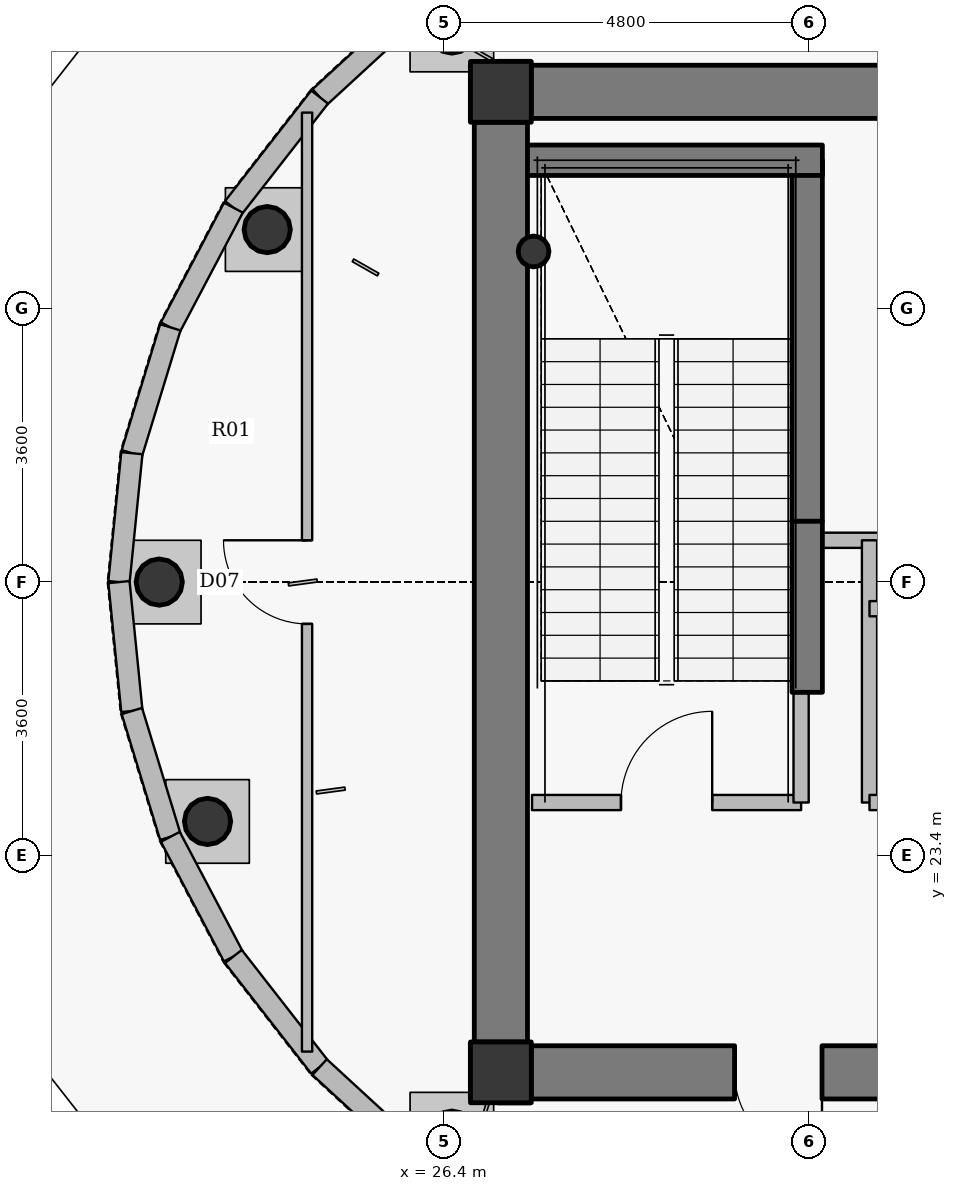
"""IFC4 building model, lengths in metres.
Left out: names, types, materials, properties, quantities, classifications, styles, units other than length and angle.
Written with IfcOpenShell. Run it as: python <this file> out.ifc"""

import sys

from ifc_helpers import new_model, si_unit, direction, frame, frame_2d, origin, origin_2d, place, context, subcontext, project, spatial, rectangle, hollow_circle, extrude, source, transform, mapped, element, fill, save


model = new_model("IFC4")
c1 = context("Model", 3, precision=1e-05, world=origin(), true_north=direction((0.0, 1.0)))
c2 = subcontext(c1, "Body", "Model", "MODEL_VIEW")
j1 = project(units=[si_unit("LENGTHUNIT", "METRE"), si_unit("PLANEANGLEUNIT", "RADIAN")], contexts=[c1])
p1 = place(None, origin())
s1 = spatial("IfcSite", under=j1, at=p1, CompositionType="ELEMENT")
p2 = place(p1, origin())
s2 = spatial("IfcBuilding", under=s1, at=p2, CompositionType="ELEMENT")
p3 = place(p2, frame((0.0, 0.0, 368.4)))
s3 = spatial("IfcBuildingStorey", under=s2, at=p3, CompositionType="ELEMENT", Elevation=368.4)
for number, where, z_axis, x_axis in (
    (1, (27.15, 20.55, 0.0), (0.0, 0.0, 1.0), (1.0, 0.0, 0.0)),
    (2, (27.15, 33.45, 0.0), (0.0, 0.0, 1.0), (1.0, 0.0, 0.0)),
):
    element("IfcColumn", number, at=place(p3, frame(where, z_axis=z_axis, x_axis=x_axis)), inside=s3, PredefinedType="COLUMN", context=c2, shape_type="SweptSolid", body=[
        extrude(rectangle(XDim=0.8, YDim=0.8, at=origin_2d()), origin(), (0.0, 0.0, 1.0), 4.8),
    ])
p4 = place(p3, frame((31.18, 27.8, 0.0), z_axis=(0.0, 0.0, 1.0), x_axis=(0.0, 1.0, 0.0)))
e3 = element("IfcWall", 3, at=p4, inside=s3, PredefinedType="SHEAR", context=c2, shape_type="SweptSolid", body=[
    extrude(rectangle(XDim=4.75, YDim=0.4, at=frame_2d((2.375, 0.0))), origin(), (0.0, 0.0, 1.0), 4.8),
])
p5 = place(p3, frame((27.25, 32.55, 0.0), z_axis=(0.0, 0.0, 1.0), x_axis=(1.0, 0.0, 0.0)))
e4 = element("IfcWall", 4, at=p5, inside=s3, PredefinedType="SHEAR", context=c2, shape_type="SweptSolid", body=[
    extrude(rectangle(XDim=4.13, YDim=0.4, at=frame_2d((2.065, 0.0))), origin(), (0.0, 0.0, 1.0), 4.8),
])
p6 = place(p3, frame((27.58, 31.35, 0.0), z_axis=(0.0, 0.0, 1.0), x_axis=(1.0, 0.0, 0.0)))
e5 = element("IfcColumn", 5, at=p6, inside=s3, PredefinedType="COLUMN", context=c2, shape_type="SweptSolid", body=[
    extrude(hollow_circle(Radius=0.203, WallThickness=0.016, at=origin_2d()), origin(), (0.0, 0.0, 1.0), 4.8),
])
p7 = place(p3, frame((27.55, 33.45, 0.0), z_axis=(0.0, 0.0, 1.0), x_axis=(1.0, 0.0, 0.0)))
e6 = element("IfcWall", 6, at=p7, inside=s3, PredefinedType="SHEAR", context=c2, shape_type="SweptSolid", body=[
    extrude(rectangle(XDim=16.9, YDim=0.7, at=frame_2d((8.45, 0.0))), origin(), (0.0, 0.0, 1.0), 4.05),
])
p8 = place(p7, frame((12.925, 0.0, 0.0)))
e7 = element("IfcOpeningElement", 7, at=p8, cuts=e6, PredefinedType="OPENING", context=c2, shape_type="SweptSolid", body=[
    extrude(rectangle(XDim=1.15, YDim=2.15, at=origin_2d()), frame((0.575, 0.36, 1.075), z_axis=(0.0, -1.0, 0.0), x_axis=(1.0, 0.0, 0.0)), (0.0, 0.0, 1.0), 0.72),
])
p9 = place(p3, frame((44.45, 20.55, 0.0), z_axis=(0.0, 0.0, 1.0), x_axis=(-1.0, 0.0, 0.0)))
e8 = element("IfcWall", 8, at=p9, inside=s3, PredefinedType="SHEAR", context=c2, shape_type="SweptSolid", body=[
    extrude(rectangle(XDim=16.9, YDim=0.7, at=frame_2d((8.45, 0.0))), origin(), (0.0, 0.0, 1.0), 4.05),
])
p10 = place(p9, frame((13.075, 0.0, 0.0)))
e9 = element("IfcOpeningElement", 9, at=p10, cuts=e8, PredefinedType="OPENING", context=c2, shape_type="SweptSolid", body=[
    extrude(rectangle(XDim=1.15, YDim=2.15, at=origin_2d()), frame((0.575, 0.36, 1.075), z_axis=(0.0, -1.0, 0.0), x_axis=(1.0, 0.0, 0.0)), (0.0, 0.0, 1.0), 0.72),
])
p11 = place(p9, frame((9.2, 0.0, 0.0)))
e10 = element("IfcOpeningElement", 10, at=p11, cuts=e8, PredefinedType="OPENING", context=c2, shape_type="SweptSolid", body=[
    extrude(rectangle(XDim=1.15, YDim=2.15, at=origin_2d()), frame((0.575, 0.36, 1.075), z_axis=(0.0, -1.0, 0.0), x_axis=(1.0, 0.0, 0.0)), (0.0, 0.0, 1.0), 0.72),
])
p12 = place(p3, frame((27.15, 20.95, 0.0), z_axis=(0.0, 0.0, 1.0), x_axis=(0.0, 1.0, 0.0)))
e11 = element("IfcWall", 11, at=p12, inside=s3, PredefinedType="SHEAR", context=c2, shape_type="SweptSolid", body=[
    extrude(rectangle(XDim=12.1, YDim=0.7, at=frame_2d((6.05, 0.0))), origin(), (0.0, 0.0, 1.0), 4.05),
])
p13 = place(p3, frame((31.18, 25.55, 0.0), z_axis=(0.0, 0.0, 1.0), x_axis=(0.0, 1.0, 0.0)))
e12 = element("IfcWall", 12, at=p13, inside=s3, PredefinedType="SHEAR", context=c2, shape_type="SweptSolid", body=[
    extrude(rectangle(XDim=2.25, YDim=0.4, at=frame_2d((1.125, 0.0))), origin(), (0.0, 0.0, 1.0), 4.1),
])
for number, where, z_axis, x_axis in (
    (13, (26.505, 34.263, -0.3), (0.0, 0.0, 1.0), (1.0, 0.0, 0.0)),
    (14, (24.075, 31.637, -0.3), (0.0, 0.0, 1.0), (1.0, 0.0, 0.0)),
    (15, (22.655, 27.0, -0.3), (0.0, 0.0, 1.0), (1.0, 0.0, 0.0)),
    (16, (23.291, 23.851, -0.3), (0.0, 0.0, 1.0), (1.0, 0.0, 0.0)),
    (17, (26.505, 19.737, -0.3), (0.0, 0.0, 1.0), (1.0, 0.0, 0.0)),
):
    element("IfcColumn", number, at=place(p3, frame(where, z_axis=z_axis, x_axis=x_axis)), inside=s3, PredefinedType="COLUMN", context=c2, shape_type="SweptSolid", body=[
        extrude(hollow_circle(Radius=0.305, WallThickness=0.025, at=origin_2d()), origin(), (0.0, 0.0, 1.0), 4.8),
    ])
p14 = place(p3, frame((24.766, 33.381, 0.0), z_axis=(0.0, 0.0, 1.0), x_axis=(0.735948763185, 0.677037235288, 0.0)))
e18 = element("IfcWall", 18, at=p14, inside=s3, PredefinedType="SOLIDWALL", context=c2, shape_type="SweptSolid", body=[
    extrude(rectangle(XDim=1.919, YDim=0.28, at=frame_2d((0.959, 0.0))), origin(), (0.0, 0.0, 1.0), 4.5),
])
p15 = place(p3, frame((23.631, 31.926, 0.0), z_axis=(0.0, 0.0, 1.0), x_axis=(0.614965988217, 0.788553633773, 0.0)))
e19 = element("IfcWall", 19, at=p15, inside=s3, PredefinedType="SOLIDWALL", context=c2, shape_type="SweptSolid", body=[
    extrude(rectangle(XDim=1.845, YDim=0.28, at=frame_2d((0.923, 0.0))), origin(), (0.0, 0.0, 1.0), 4.5),
])
p16 = place(p3, frame((22.801, 30.351, 0.0), z_axis=(0.0, 0.0, 1.0), x_axis=(0.466368181746, 0.884590707082, 0.0)))
e20 = element("IfcWall", 20, at=p16, inside=s3, PredefinedType="SOLIDWALL", context=c2, shape_type="SweptSolid", body=[
    extrude(rectangle(XDim=1.78, YDim=0.28, at=frame_2d((0.89, 0.0))), origin(), (0.0, 0.0, 1.0), 4.5),
])
p17 = place(p3, frame((22.295, 28.696, 0.0), z_axis=(0.0, 0.0, 1.0), x_axis=(0.292261538012, 0.956338430368, 0.0)))
e21 = element("IfcWall", 21, at=p17, inside=s3, PredefinedType="SOLIDWALL", context=c2, shape_type="SweptSolid", body=[
    extrude(rectangle(XDim=1.731, YDim=0.28, at=frame_2d((0.865, 0.0))), origin(), (0.0, 0.0, 1.0), 4.5),
])
for number, where, z_axis, x_axis in (
    (22, (22.125, 27.0, 0.0), (0.0, 0.0, 1.0), (0.1, 0.995, 0.0)),
    (23, (22.295, 25.304, 0.0), (0.0, 0.0, 1.0), (-0.1, 0.995, 0.0)),
):
    element("IfcWall", number, at=place(p3, frame(where, z_axis=z_axis, x_axis=x_axis)), inside=s3, PredefinedType="SOLIDWALL", context=c2, shape_type="SweptSolid", body=[
        extrude(rectangle(XDim=1.705, YDim=0.28, at=frame_2d((0.852, 0.0))), origin(), (0.0, 0.0, 1.0), 4.5),
    ])
p18 = place(p3, frame((22.801, 23.649, 0.0), z_axis=(0.0, 0.0, 1.0), x_axis=(-0.292261538012, 0.956338430368, 0.0)))
e24 = element("IfcWall", 24, at=p18, inside=s3, PredefinedType="SOLIDWALL", context=c2, shape_type="SweptSolid", body=[
    extrude(rectangle(XDim=1.731, YDim=0.28, at=frame_2d((0.865, 0.0))), origin(), (0.0, 0.0, 1.0), 4.5),
])
p19 = place(p3, frame((23.631, 22.074, 0.0), z_axis=(0.0, 0.0, 1.0), x_axis=(-0.466368181746, 0.884590707082, 0.0)))
e25 = element("IfcWall", 25, at=p19, inside=s3, PredefinedType="SOLIDWALL", context=c2, shape_type="SweptSolid", body=[
    extrude(rectangle(XDim=1.78, YDim=0.28, at=frame_2d((0.89, 0.0))), origin(), (0.0, 0.0, 1.0), 4.5),
])
p20 = place(p3, frame((24.766, 20.619, 0.0), z_axis=(0.0, 0.0, 1.0), x_axis=(-0.614965988217, 0.788553633773, 0.0)))
e26 = element("IfcWall", 26, at=p20, inside=s3, PredefinedType="SOLIDWALL", context=c2, shape_type="SweptSolid", body=[
    extrude(rectangle(XDim=1.845, YDim=0.28, at=frame_2d((0.923, 0.0))), origin(), (0.0, 0.0, 1.0), 4.5),
])
p21 = place(p3, frame((26.178, 19.32, 0.0), z_axis=(0.0, 0.0, 1.0), x_axis=(-0.735948763185, 0.677037235288, 0.0)))
e27 = element("IfcWall", 27, at=p21, inside=s3, PredefinedType="SOLIDWALL", context=c2, shape_type="SweptSolid", body=[
    extrude(rectangle(XDim=1.919, YDim=0.28, at=frame_2d((0.959, 0.0))), origin(), (0.0, 0.0, 1.0), 4.5),
])
p22 = place(p3, frame((24.6, 20.823, 0.0), z_axis=(0.0, 0.0, 1.0), x_axis=(0.0, 1.0, 0.0)))
e28 = element("IfcWall", 28, at=p22, inside=s3, PredefinedType="PARTITIONING", context=c2, shape_type="SweptSolid", body=[
    extrude(rectangle(XDim=12.353, YDim=0.135, at=frame_2d((6.177, 0.0))), origin(), (0.0, 0.0, 1.0), 3.985),
])
p23 = place(p22, frame((5.627, 0.0, 0.0)))
e29 = element("IfcOpeningElement", 29, at=p23, cuts=e28, PredefinedType="OPENING", context=c2, shape_type="SweptSolid", body=[
    extrude(rectangle(XDim=1.1, YDim=2.15, at=origin_2d()), frame((0.55, 0.078, 1.075), z_axis=(0.0, -1.0, 0.0), x_axis=(1.0, 0.0, 0.0)), (0.0, 0.0, 1.0), 0.155),
])
p24 = place(p3, frame((27.56, 24.1, 0.0), z_axis=(0.0, 0.0, 1.0), x_axis=(1.0, 0.0, 0.0)))
e30 = element("IfcWall", 30, at=p24, inside=s3, PredefinedType="PARTITIONING", context=c2, shape_type="SweptSolid", body=[
    extrude(rectangle(XDim=3.54, YDim=0.2, at=frame_2d((1.77, 0.0))), origin(), (0.0, 0.0, 1.0), 4.5),
])
p25 = place(p24, frame((1.17, 0.0, 0.0)))
e31 = element("IfcOpeningElement", 31, at=p25, cuts=e30, PredefinedType="OPENING", context=c2, shape_type="SweptSolid", body=[
    extrude(rectangle(XDim=1.2, YDim=2.15, at=origin_2d()), frame((0.6, 0.11, 1.075), z_axis=(0.0, -1.0, 0.0), x_axis=(1.0, 0.0, 0.0)), (0.0, 0.0, 1.0), 0.22),
])
p26 = place(p3, frame((31.1, 24.1, 0.0), z_axis=(0.0, 0.0, 1.0), x_axis=(0.0, 1.0, 0.0)))
e32 = element("IfcWall", 32, at=p26, inside=s3, PredefinedType="PARTITIONING", context=c2, shape_type="SweptSolid", body=[
    extrude(rectangle(XDim=1.44, YDim=0.2, at=frame_2d((0.72, 0.0))), origin(), (0.0, 0.0, 1.0), 4.5),
])
p27 = place(p3, frame((31.1, 27.55, 0.0), z_axis=(0.0, 0.0, 1.0), x_axis=(1.0, 0.0, 0.0)))
e33 = element("IfcWall", 33, at=p27, inside=s3, PredefinedType="PARTITIONING", context=c2, shape_type="SweptSolid", body=[
    extrude(rectangle(XDim=2.8, YDim=0.2, at=frame_2d((1.4, 0.0))), origin(), (0.0, 0.0, 1.0), 4.085),
])
p28 = place(p27, frame((1.5, 0.0, 0.0)))
e34 = element("IfcOpeningElement", 34, at=p28, cuts=e33, PredefinedType="OPENING", context=c2, shape_type="SweptSolid", body=[
    extrude(rectangle(XDim=0.66, YDim=2.05, at=origin_2d()), frame((0.33, 0.11, 1.025), z_axis=(0.0, -1.0, 0.0), x_axis=(1.0, 0.0, 0.0)), (0.0, 0.0, 1.0), 0.22),
])
p29 = place(p3, frame((32.0, 24.1, 0.0), z_axis=(0.0, 0.0, 1.0), x_axis=(0.0, 1.0, 0.0)))
e35 = element("IfcWall", 35, at=p29, inside=s3, PredefinedType="PARTITIONING", context=c2, shape_type="SweptSolid", body=[
    extrude(rectangle(XDim=3.45, YDim=0.2, at=frame_2d((1.725, 0.0))), origin(), (0.0, 0.0, 1.0), 4.5),
])
p30 = place(p3, frame((32.0, 24.1, 0.0), z_axis=(0.0, 0.0, 1.0), x_axis=(1.0, 0.0, 0.0)))
e36 = element("IfcWall", 36, at=p30, inside=s3, PredefinedType="PARTITIONING", context=c2, shape_type="SweptSolid", body=[
    extrude(rectangle(XDim=1.9, YDim=0.2, at=frame_2d((0.95, 0.0))), origin(), (0.0, 0.0, 1.0), 4.085),
])
p31 = place(p30, frame((0.375, 0.0, 0.0)))
e37 = element("IfcOpeningElement", 37, at=p31, cuts=e36, PredefinedType="OPENING", context=c2, shape_type="SweptSolid", body=[
    extrude(rectangle(XDim=1.15, YDim=2.15, at=origin_2d()), frame((0.575, 0.11, 1.075), z_axis=(0.0, -1.0, 0.0), x_axis=(1.0, 0.0, 0.0)), (0.0, 0.0, 1.0), 0.22),
])
p32 = place(p3, frame((32.0, 26.65, 0.0), z_axis=(0.0, 0.0, 1.0), x_axis=(1.0, 0.0, 0.0)))
e38 = element("IfcWall", 38, at=p32, inside=s3, PredefinedType="PARTITIONING", context=c2, shape_type="SweptSolid", body=[
    extrude(rectangle(XDim=1.9, YDim=0.2, at=frame_2d((0.95, 0.0))), origin(), (0.0, 0.0, 1.0), 4.085),
])
p33 = place(p3, frame((26.8, 33.8, 0.0), z_axis=(0.0, 0.0, 1.0), x_axis=(0.0, -1.0, 0.0)))
e39 = element("IfcWall", 39, at=p33, inside=s3, PredefinedType="PARTITIONING", context=c2, shape_type="SweptSolid", body=[
    extrude(rectangle(XDim=0.74, YDim=0.135, at=frame_2d((0.37, 0.0))), origin(), (0.0, 0.0, 1.0), 3.985),
])
p34 = place(p3, frame((26.8, 20.94, 0.0), z_axis=(0.0, 0.0, 1.0), x_axis=(0.0, -1.0, 0.0)))
e40 = element("IfcWall", 40, at=p34, inside=s3, PredefinedType="PARTITIONING", context=c2, shape_type="SweptSolid", body=[
    extrude(rectangle(XDim=0.74, YDim=0.135, at=frame_2d((0.37, 0.0))), origin(), (0.0, 0.0, 1.0), 4.035),
])
p35 = place(p3, frame((27.107, 20.2, 0.0), z_axis=(0.0, 0.0, 1.0), x_axis=(1.0, 0.0, 0.0)))
e41 = element("IfcWall", 41, at=p35, inside=s3, PredefinedType="PARTITIONING", context=c2, shape_type="SweptSolid", body=[
    extrude(rectangle(XDim=0.433, YDim=0.135, at=frame_2d((0.216, 0.0))), origin(), (0.0, 0.0, 1.0), 3.985),
])
p36 = place(p3, frame((27.54, 33.8, 0.0), z_axis=(0.0, 0.0, 1.0), x_axis=(-1.0, 0.0, 0.0)))
e42 = element("IfcWall", 42, at=p36, inside=s3, PredefinedType="PARTITIONING", context=c2, shape_type="SweptSolid", body=[
    extrude(rectangle(XDim=0.433, YDim=0.135, at=frame_2d((0.216, 0.0))), origin(), (0.0, 0.0, 1.0), 4.035),
])
m1 = source(origin(), c2, "Body", "SweptSolid", [
    extrude(rectangle(XDim=1.15, YDim=2.15, at=origin_2d()), frame((0.575, 0.025, 1.075), z_axis=(0.0, -1.0, 0.0), x_axis=(1.0, 0.0, 0.0)), (0.0, 0.0, 1.0), 0.05),
])
p37 = place(p10, origin())
e43 = element("IfcDoor", 43, at=p37, inside=s3, OperationType="SINGLE_SWING_LEFT", PredefinedType="DOOR", context=c2, shape_type="MappedRepresentation", body=[
    mapped(m1, transform((0.0, 0.0, 0.0), x_axis=(1.0, 0.0, 0.0), y_axis=(0.0, 1.0, 0.0), z_axis=(0.0, 0.0, 1.0), scale=1.0)),
])
fill(e9, e43)
m2 = source(origin(), c2, "Body", "SweptSolid", [
    extrude(rectangle(XDim=1.2, YDim=2.15, at=origin_2d()), frame((0.6, 0.025, 1.075), z_axis=(0.0, -1.0, 0.0), x_axis=(1.0, 0.0, 0.0)), (0.0, 0.0, 1.0), 0.05),
])
p38 = place(p25, origin())
e44 = element("IfcDoor", 44, at=p38, inside=s3, OperationType="SINGLE_SWING_RIGHT", PredefinedType="DOOR", context=c2, shape_type="MappedRepresentation", body=[
    mapped(m2, transform((0.0, 0.0, 0.0), x_axis=(1.0, 0.0, 0.0), y_axis=(0.0, 1.0, 0.0), z_axis=(0.0, 0.0, 1.0), scale=1.0)),
])
fill(e31, e44)
m3 = source(origin(), c2, "Body", "SweptSolid", [
    extrude(rectangle(XDim=1.1, YDim=2.15, at=origin_2d()), frame((0.55, 0.025, 1.075), z_axis=(0.0, -1.0, 0.0), x_axis=(1.0, 0.0, 0.0)), (0.0, 0.0, 1.0), 0.05),
])
p39 = place(p23, origin())
e45 = element("IfcDoor", 45, at=p39, inside=s3, OperationType="SINGLE_SWING_RIGHT", PredefinedType="DOOR", context=c2, shape_type="MappedRepresentation", body=[
    mapped(m3, transform((0.0, 0.0, 0.0), x_axis=(1.0, 0.0, 0.0), y_axis=(0.0, 1.0, 0.0), z_axis=(0.0, 0.0, 1.0), scale=1.0)),
])
fill(e29, e45)
save(model, sys.argv[1])
